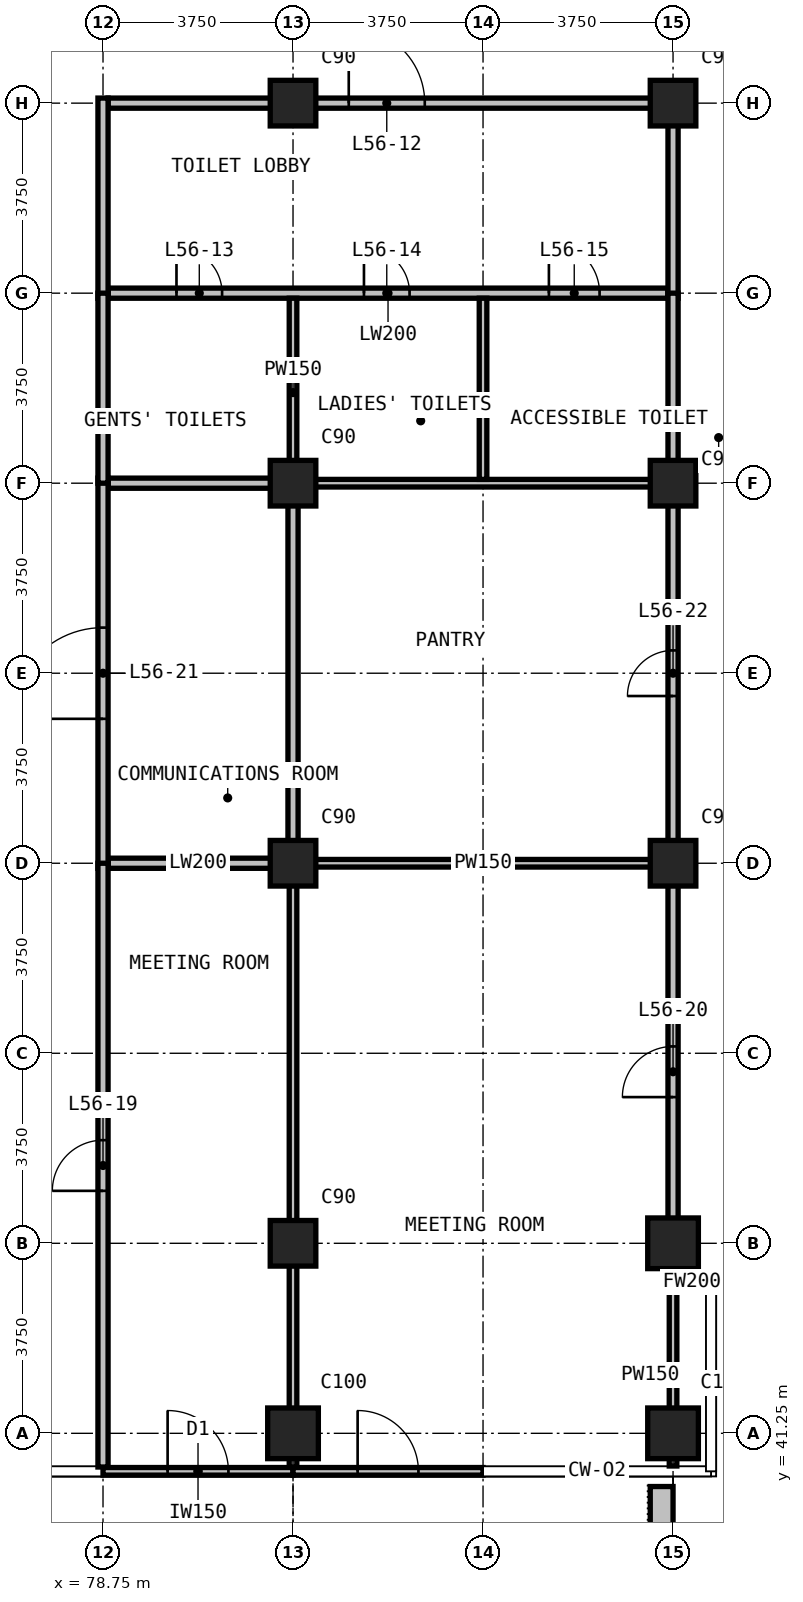
"""IFC4 building model, lengths in metres.
Left out: names, types, materials, properties, quantities, classifications, styles, units other than length and angle.
Written with IfcOpenShell. Run it as: python <this file> out.ifc"""

import sys

from ifc_helpers import new_model, si_unit, direction, frame, frame_2d, origin, origin_2d, place, context, subcontext, project, spatial, rectangle, extrude, element, fill, save


model = new_model("IFC4")
c1 = context("Model", 3, precision=1e-05, world=origin(), true_north=direction((0.0, 1.0)))
c2 = subcontext(c1, "Body", "Model", "MODEL_VIEW")
j1 = project(units=[si_unit("LENGTHUNIT", "METRE"), si_unit("PLANEANGLEUNIT", "RADIAN")], contexts=[c1])
p1 = place(None, origin())
s1 = spatial("IfcSite", under=j1, at=p1, CompositionType="ELEMENT")
p2 = place(p1, origin())
s2 = spatial("IfcBuilding", under=s1, at=p2, CompositionType="ELEMENT")
p3 = place(p2, frame((0.0, 0.0, 217.5)))
s3 = spatial("IfcBuildingStorey", under=s2, at=p3, CompositionType="ELEMENT", Elevation=217.5)
p4 = place(p3, frame((82.5, 41.25, 0.0), z_axis=(0.0, 0.0, 1.0), x_axis=(1.0, 0.0, 0.0)))
e1 = element("IfcColumn", 1, at=p4, inside=s3, PredefinedType="COLUMN", context=c2, shape_type="SweptSolid", body=[
    extrude(rectangle(XDim=1.0, YDim=1.0, at=origin_2d()), origin(), (0.0, 0.0, 1.0), 3.6),
])
for number, where, z_axis, x_axis in (
    (2, (82.5, 45.0, 0.0), (0.0, 0.0, 1.0), (1.0, 0.0, 0.0)),
    (3, (82.5, 52.5, 0.0), (0.0, 0.0, 1.0), (1.0, 0.0, 0.0)),
    (4, (82.5, 60.0, 0.0), (0.0, 0.0, 1.0), (1.0, 0.0, 0.0)),
    (5, (82.5, 67.5, 0.0), (0.0, 0.0, 1.0), (1.0, 0.0, 0.0)),
):
    element("IfcColumn", number, at=place(p3, frame(where, z_axis=z_axis, x_axis=x_axis)), inside=s3, PredefinedType="COLUMN", context=c2, shape_type="SweptSolid", body=[
        extrude(rectangle(XDim=0.9, YDim=0.9, at=origin_2d()), origin(), (0.0, 0.0, 1.0), 3.6),
    ])
for number, where, z_axis, x_axis in (
    (6, (90.0, 41.25, 0.0), (0.0, 0.0, 1.0), (1.0, 0.0, 0.0)),
    (7, (90.0, 45.0, 0.0), (0.0, 0.0, 1.0), (1.0, 0.0, 0.0)),
):
    element("IfcColumn", number, at=place(p3, frame(where, z_axis=z_axis, x_axis=x_axis)), inside=s3, PredefinedType="COLUMN", context=c2, shape_type="SweptSolid", body=[
        extrude(rectangle(XDim=1.0, YDim=1.0, at=origin_2d()), origin(), (0.0, 0.0, 1.0), 3.6),
    ])
for number, where, z_axis, x_axis in (
    (8, (90.0, 52.5, 0.0), (0.0, 0.0, 1.0), (1.0, 0.0, 0.0)),
    (9, (90.0, 60.0, 0.0), (0.0, 0.0, 1.0), (1.0, 0.0, 0.0)),
    (10, (90.0, 67.5, 0.0), (0.0, 0.0, 1.0), (1.0, 0.0, 0.0)),
):
    element("IfcColumn", number, at=place(p3, frame(where, z_axis=z_axis, x_axis=x_axis)), inside=s3, PredefinedType="COLUMN", context=c2, shape_type="SweptSolid", body=[
        extrude(rectangle(XDim=0.9, YDim=0.9, at=origin_2d()), origin(), (0.0, 0.0, 1.0), 3.6),
    ])
p5 = place(p3, frame((78.75, 40.5, 0.0), z_axis=(0.0, 0.0, 1.0), x_axis=(1.0, 0.0, 0.0)))
e11 = element("IfcWall", 11, at=p5, inside=s3, PredefinedType="SOLIDWALL", context=c2, shape_type="SweptSolid", body=[
    extrude(rectangle(XDim=3.75, YDim=0.15, at=frame_2d((1.875, 0.0))), origin(), (0.0, 0.0, 1.0), 3.3),
])
p6 = place(p5, frame((1.275, 0.0, 0.0)))
e12 = element("IfcOpeningElement", 12, at=p6, cuts=e11, PredefinedType="OPENING", context=c2, shape_type="SweptSolid", body=[
    extrude(rectangle(XDim=1.2, YDim=2.4, at=frame_2d((0.6, 1.2))), frame((0.0, 0.085, 0.0), z_axis=(0.0, -1.0, 0.0), x_axis=(1.0, 0.0, 0.0)), (0.0, 0.0, 1.0), 0.17),
])
p7 = place(p3, frame((82.5, 40.5, 0.0), z_axis=(0.0, 0.0, 1.0), x_axis=(1.0, 0.0, 0.0)))
e13 = element("IfcWall", 13, at=p7, inside=s3, PredefinedType="SOLIDWALL", context=c2, shape_type="SweptSolid", body=[
    extrude(rectangle(XDim=3.75, YDim=0.15, at=frame_2d((1.875, 0.0))), origin(), (0.0, 0.0, 1.0), 3.3),
])
p8 = place(p7, frame((1.275, 0.0, 0.0)))
e14 = element("IfcOpeningElement", 14, at=p8, cuts=e13, PredefinedType="OPENING", context=c2, shape_type="SweptSolid", body=[
    extrude(rectangle(XDim=1.2, YDim=2.4, at=frame_2d((0.6, 1.2))), frame((0.0, 0.085, 0.0), z_axis=(0.0, -1.0, 0.0), x_axis=(1.0, 0.0, 0.0)), (0.0, 0.0, 1.0), 0.17),
])
p9 = place(p3, frame((89.775, 40.2, 0.0), z_axis=(0.0, 0.0, 1.0), x_axis=(0.0, -1.0, 0.0)))
e15 = element("IfcWall", 15, at=p9, inside=s3, PredefinedType="USERDEFINED", context=c2, shape_type="SweptSolid", body=[
    extrude(rectangle(XDim=2.35, YDim=0.45, at=frame_2d((1.175, 0.0))), origin(), (0.0, 0.0, 1.0), 1.1),
])
for number, where, z_axis, x_axis in (
    (16, (78.85, 52.5, 0.0), (0.0, 0.0, 1.0), (1.0, 0.0, 0.0)),
    (17, (78.85, 60.0, 0.0), (0.0, 0.0, 1.0), (1.0, 0.0, 0.0)),
):
    element("IfcWall", number, at=place(p3, frame(where, z_axis=z_axis, x_axis=x_axis)), inside=s3, PredefinedType="PARTITIONING", context=c2, shape_type="SweptSolid", body=[
        extrude(rectangle(XDim=3.55, YDim=0.2, at=frame_2d((1.775, 0.0))), origin(), (0.0, 0.0, 1.0), 3.3),
    ])
p10 = place(p3, frame((78.85, 63.75, 0.0), z_axis=(0.0, 0.0, 1.0), x_axis=(1.0, 0.0, 0.0)))
e18 = element("IfcWall", 18, at=p10, inside=s3, PredefinedType="PARTITIONING", context=c2, shape_type="SweptSolid", body=[
    extrude(rectangle(XDim=11.05, YDim=0.2, at=frame_2d((5.525, 0.0))), origin(), (0.0, 0.0, 1.0), 3.3),
])
p11 = place(p10, frame((1.35, 0.0, 0.0)))
e19 = element("IfcOpeningElement", 19, at=p11, cuts=e18, PredefinedType="OPENING", context=c2, shape_type="SweptSolid", body=[
    extrude(rectangle(XDim=0.9, YDim=2.2, at=frame_2d((0.45, 1.1))), frame((0.0, 0.11, 0.0), z_axis=(0.0, -1.0, 0.0), x_axis=(1.0, 0.0, 0.0)), (0.0, 0.0, 1.0), 0.22),
])
p12 = place(p10, frame((5.05, 0.0, 0.0)))
e20 = element("IfcOpeningElement", 20, at=p12, cuts=e18, PredefinedType="OPENING", context=c2, shape_type="SweptSolid", body=[
    extrude(rectangle(XDim=0.9, YDim=2.2, at=frame_2d((0.45, 1.1))), frame((0.0, 0.11, 0.0), z_axis=(0.0, -1.0, 0.0), x_axis=(1.0, 0.0, 0.0)), (0.0, 0.0, 1.0), 0.22),
])
p13 = place(p10, frame((8.7, 0.0, 0.0)))
e21 = element("IfcOpeningElement", 21, at=p13, cuts=e18, PredefinedType="OPENING", context=c2, shape_type="SweptSolid", body=[
    extrude(rectangle(XDim=1.0, YDim=2.2, at=frame_2d((0.5, 1.1))), frame((0.0, 0.11, 0.0), z_axis=(0.0, -1.0, 0.0), x_axis=(1.0, 0.0, 0.0)), (0.0, 0.0, 1.0), 0.22),
])
p14 = place(p3, frame((78.85, 67.5, 0.0), z_axis=(0.0, 0.0, 1.0), x_axis=(1.0, 0.0, 0.0)))
e22 = element("IfcWall", 22, at=p14, inside=s3, PredefinedType="PARTITIONING", context=c2, shape_type="SweptSolid", body=[
    extrude(rectangle(XDim=11.05, YDim=0.2, at=frame_2d((5.525, 0.0))), origin(), (0.0, 0.0, 1.0), 3.3),
])
p15 = place(p14, frame((4.75, 0.0, 0.0)))
e23 = element("IfcOpeningElement", 23, at=p15, cuts=e22, PredefinedType="OPENING", context=c2, shape_type="SweptSolid", body=[
    extrude(rectangle(XDim=1.5, YDim=2.2, at=frame_2d((0.75, 1.1))), frame((0.0, 0.11, 0.0), z_axis=(0.0, -1.0, 0.0), x_axis=(1.0, 0.0, 0.0)), (0.0, 0.0, 1.0), 0.22),
])
p16 = place(p3, frame((78.75, 52.4, 0.0), z_axis=(0.0, 0.0, 1.0), x_axis=(0.0, 1.0, 0.0)))
e24 = element("IfcWall", 24, at=p16, inside=s3, PredefinedType="PARTITIONING", context=c2, shape_type="SweptSolid", body=[
    extrude(rectangle(XDim=7.7, YDim=0.2, at=frame_2d((3.85, 0.0))), origin(), (0.0, 0.0, 1.0), 3.3),
])
p17 = place(p16, frame((2.95, 0.0, 0.0)))
e25 = element("IfcOpeningElement", 25, at=p17, cuts=e24, PredefinedType="OPENING", context=c2, shape_type="SweptSolid", body=[
    extrude(rectangle(XDim=1.8, YDim=2.4, at=frame_2d((0.9, 1.2))), frame((0.0, 0.11, 0.0), z_axis=(0.0, -1.0, 0.0), x_axis=(1.0, 0.0, 0.0)), (0.0, 0.0, 1.0), 0.22),
])
p18 = place(p3, frame((78.75, 63.65, 0.0), z_axis=(0.0, 0.0, 1.0), x_axis=(0.0, 1.0, 0.0)))
e26 = element("IfcWall", 26, at=p18, inside=s3, PredefinedType="PARTITIONING", context=c2, shape_type="SweptSolid", body=[
    extrude(rectangle(XDim=3.95, YDim=0.2, at=frame_2d((1.975, 0.0))), origin(), (0.0, 0.0, 1.0), 3.3),
])
p19 = place(p3, frame((82.5, 52.4, 0.0), z_axis=(0.0, 0.0, 1.0), x_axis=(0.0, 1.0, 0.0)))
e27 = element("IfcWall", 27, at=p19, inside=s3, PredefinedType="PARTITIONING", context=c2, shape_type="SweptSolid", body=[
    extrude(rectangle(XDim=7.7, YDim=0.2, at=frame_2d((3.85, 0.0))), origin(), (0.0, 0.0, 1.0), 3.3),
])
p20 = place(p3, frame((90.0, 63.65, 0.0), z_axis=(0.0, 0.0, 1.0), x_axis=(0.0, 1.0, 0.0)))
e28 = element("IfcWall", 28, at=p20, inside=s3, PredefinedType="PARTITIONING", context=c2, shape_type="SweptSolid", body=[
    extrude(rectangle(XDim=3.95, YDim=0.2, at=frame_2d((1.975, 0.0))), origin(), (0.0, 0.0, 1.0), 3.3),
])
p21 = place(p3, frame((90.1, 44.235, 0.0), z_axis=(0.0, 0.0, 1.0), x_axis=(1.0, 0.0, 0.0)))
e29 = element("IfcWall", 29, at=p21, inside=s3, PredefinedType="PARTITIONING", context=c2, shape_type="SweptSolid", body=[
    extrude(rectangle(XDim=0.545, YDim=0.2, at=frame_2d((0.272, 0.0))), origin(), (0.0, 0.0, 1.0), 3.3),
])
p22 = place(p3, frame((78.75, 40.585, 0.0), z_axis=(0.0, 0.0, 1.0), x_axis=(0.0, 1.0, 0.0)))
e30 = element("IfcWall", 30, at=p22, inside=s3, PredefinedType="PARTITIONING", context=c2, shape_type="SweptSolid", body=[
    extrude(rectangle(XDim=11.915, YDim=0.2, at=frame_2d((5.958, 0.0))), origin(), (0.0, 0.0, 1.0), 3.3),
])
p23 = place(p22, frame((5.45, 0.0, 0.0)))
e31 = element("IfcOpeningElement", 31, at=p23, cuts=e30, PredefinedType="OPENING", context=c2, shape_type="SweptSolid", body=[
    extrude(rectangle(XDim=1.0, YDim=2.2, at=frame_2d((0.5, 1.1))), frame((0.0, 0.11, 0.0), z_axis=(0.0, -1.0, 0.0), x_axis=(1.0, 0.0, 0.0)), (0.0, 0.0, 1.0), 0.22),
])
p24 = place(p3, frame((78.75, 60.0, 0.0), z_axis=(0.0, 0.0, 1.0), x_axis=(0.0, 1.0, 0.0)))
e32 = element("IfcWall", 32, at=p24, inside=s3, PredefinedType="PARTITIONING", context=c2, shape_type="SweptSolid", body=[
    extrude(rectangle(XDim=3.75, YDim=0.2, at=frame_2d((1.875, 0.0))), origin(), (0.0, 0.0, 1.0), 3.3),
])
p25 = place(p3, frame((90.0, 44.135, 0.0), z_axis=(0.0, 0.0, 1.0), x_axis=(0.0, 1.0, 0.0)))
e33 = element("IfcWall", 33, at=p25, inside=s3, PredefinedType="PARTITIONING", context=c2, shape_type="SweptSolid", body=[
    extrude(rectangle(XDim=19.615, YDim=0.2, at=frame_2d((9.808, 0.0))), origin(), (0.0, 0.0, 1.0), 3.3),
])
p26 = place(p25, frame((3.75, 0.0, 0.0)))
e34 = element("IfcOpeningElement", 34, at=p26, cuts=e33, PredefinedType="OPENING", context=c2, shape_type="SweptSolid", body=[
    extrude(rectangle(XDim=1.0, YDim=2.2, at=frame_2d((0.5, 1.1))), frame((0.0, 0.11, 0.0), z_axis=(0.0, -1.0, 0.0), x_axis=(1.0, 0.0, 0.0)), (0.0, 0.0, 1.0), 0.22),
])
p27 = place(p25, frame((11.665, 0.0, 0.0)))
e35 = element("IfcOpeningElement", 35, at=p27, cuts=e33, PredefinedType="OPENING", context=c2, shape_type="SweptSolid", body=[
    extrude(rectangle(XDim=0.9, YDim=2.2, at=frame_2d((0.45, 1.1))), frame((0.0, 0.11, 0.0), z_axis=(0.0, -1.0, 0.0), x_axis=(1.0, 0.0, 0.0)), (0.0, 0.0, 1.0), 0.22),
])
for number, where, z_axis, x_axis in (
    (36, (82.6, 52.5, 0.0), (0.0, 0.0, 1.0), (1.0, 0.0, 0.0)),
    (37, (82.6, 60.0, 0.0), (0.0, 0.0, 1.0), (1.0, 0.0, 0.0)),
):
    element("IfcWall", number, at=place(p3, frame(where, z_axis=z_axis, x_axis=x_axis)), inside=s3, PredefinedType="PARTITIONING", context=c2, shape_type="SweptSolid", body=[
        extrude(rectangle(XDim=7.3, YDim=0.15, at=frame_2d((3.65, 0.0))), origin(), (0.0, 0.0, 1.0), 3.3),
    ])
p28 = place(p3, frame((82.5, 40.585, 0.0), z_axis=(0.0, 0.0, 1.0), x_axis=(0.0, 1.0, 0.0)))
e38 = element("IfcWall", 38, at=p28, inside=s3, PredefinedType="PARTITIONING", context=c2, shape_type="SweptSolid", body=[
    extrude(rectangle(XDim=11.99, YDim=0.15, at=frame_2d((5.995, 0.0))), origin(), (0.0, 0.0, 1.0), 3.3),
])
p29 = place(p3, frame((82.5, 59.925, 0.0), z_axis=(0.0, 0.0, 1.0), x_axis=(0.0, 1.0, 0.0)))
e39 = element("IfcWall", 39, at=p29, inside=s3, PredefinedType="PARTITIONING", context=c2, shape_type="SweptSolid", body=[
    extrude(rectangle(XDim=3.725, YDim=0.15, at=frame_2d((1.862, 0.0))), origin(), (0.0, 0.0, 1.0), 3.3),
])
p30 = place(p3, frame((86.25, 60.075, 0.0), z_axis=(0.0, 0.0, 1.0), x_axis=(0.0, 1.0, 0.0)))
e40 = element("IfcWall", 40, at=p30, inside=s3, PredefinedType="PARTITIONING", context=c2, shape_type="SweptSolid", body=[
    extrude(rectangle(XDim=3.575, YDim=0.15, at=frame_2d((1.788, 0.0))), origin(), (0.0, 0.0, 1.0), 3.3),
])
p31 = place(p3, frame((90.0, 40.605, 0.0), z_axis=(0.0, 0.0, 1.0), x_axis=(0.0, 1.0, 0.0)))
e41 = element("IfcWall", 41, at=p31, inside=s3, PredefinedType="PARTITIONING", context=c2, shape_type="SweptSolid", body=[
    extrude(rectangle(XDim=3.6, YDim=0.15, at=frame_2d((1.8, 0.0))), origin(), (0.0, 0.0, 1.0), 3.3),
])
p32 = place(p6, origin())
e42 = element("IfcDoor", 42, at=p32, inside=s3, OperationType="SINGLE_SWING_LEFT", PredefinedType="DOOR", context=c2, shape_type="SweptSolid", body=[
    extrude(rectangle(XDim=1.2, YDim=2.4, at=frame_2d((0.6, 1.2))), frame((0.0, 0.025, 0.0), z_axis=(0.0, -1.0, 0.0), x_axis=(1.0, 0.0, 0.0)), (0.0, 0.0, 1.0), 0.05),
])
fill(e12, e42)
p33 = place(p8, origin())
e43 = element("IfcDoor", 43, at=p33, inside=s3, OperationType="SINGLE_SWING_LEFT", PredefinedType="DOOR", context=c2, shape_type="SweptSolid", body=[
    extrude(rectangle(XDim=1.2, YDim=2.4, at=frame_2d((0.6, 1.2))), frame((0.0, 0.025, 0.0), z_axis=(0.0, -1.0, 0.0), x_axis=(1.0, 0.0, 0.0)), (0.0, 0.0, 1.0), 0.05),
])
fill(e14, e43)
p34 = place(p15, origin())
e44 = element("IfcDoor", 44, at=p34, inside=s3, OperationType="DOUBLE_DOOR_SINGLE_SWING", PredefinedType="DOOR", context=c2, shape_type="SweptSolid", body=[
    extrude(rectangle(XDim=1.5, YDim=2.2, at=frame_2d((0.75, 1.1))), frame((0.0, 0.025, 0.0), z_axis=(0.0, -1.0, 0.0), x_axis=(1.0, 0.0, 0.0)), (0.0, 0.0, 1.0), 0.05),
])
fill(e23, e44)
p35 = place(p11, origin())
e45 = element("IfcDoor", 45, at=p35, inside=s3, OperationType="SINGLE_SWING_LEFT", PredefinedType="DOOR", context=c2, shape_type="SweptSolid", body=[
    extrude(rectangle(XDim=0.9, YDim=2.2, at=frame_2d((0.45, 1.1))), frame((0.0, 0.025, 0.0), z_axis=(0.0, -1.0, 0.0), x_axis=(1.0, 0.0, 0.0)), (0.0, 0.0, 1.0), 0.05),
])
fill(e19, e45)
p36 = place(p12, origin())
e46 = element("IfcDoor", 46, at=p36, inside=s3, OperationType="SINGLE_SWING_LEFT", PredefinedType="DOOR", context=c2, shape_type="SweptSolid", body=[
    extrude(rectangle(XDim=0.9, YDim=2.2, at=frame_2d((0.45, 1.1))), frame((0.0, 0.025, 0.0), z_axis=(0.0, -1.0, 0.0), x_axis=(1.0, 0.0, 0.0)), (0.0, 0.0, 1.0), 0.05),
])
fill(e20, e46)
p37 = place(p13, origin())
e47 = element("IfcDoor", 47, at=p37, inside=s3, OperationType="SINGLE_SWING_LEFT", PredefinedType="DOOR", context=c2, shape_type="SweptSolid", body=[
    extrude(rectangle(XDim=1.0, YDim=2.2, at=frame_2d((0.5, 1.1))), frame((0.0, 0.025, 0.0), z_axis=(0.0, -1.0, 0.0), x_axis=(1.0, 0.0, 0.0)), (0.0, 0.0, 1.0), 0.05),
])
fill(e21, e47)
p38 = place(p23, origin())
e48 = element("IfcDoor", 48, at=p38, inside=s3, OperationType="SINGLE_SWING_RIGHT", PredefinedType="DOOR", context=c2, shape_type="SweptSolid", body=[
    extrude(rectangle(XDim=1.0, YDim=2.2, at=frame_2d((0.5, 1.1))), frame((0.0, 0.025, 0.0), z_axis=(0.0, -1.0, 0.0), x_axis=(1.0, 0.0, 0.0)), (0.0, 0.0, 1.0), 0.05),
])
fill(e31, e48)
p39 = place(p26, origin())
e49 = element("IfcDoor", 49, at=p39, inside=s3, OperationType="SINGLE_SWING_LEFT", PredefinedType="DOOR", context=c2, shape_type="SweptSolid", body=[
    extrude(rectangle(XDim=1.0, YDim=2.2, at=frame_2d((0.5, 1.1))), frame((0.0, 0.025, 0.0), z_axis=(0.0, -1.0, 0.0), x_axis=(1.0, 0.0, 0.0)), (0.0, 0.0, 1.0), 0.05),
])
fill(e34, e49)
p40 = place(p17, origin())
e50 = element("IfcDoor", 50, at=p40, inside=s3, OperationType="DOUBLE_DOOR_SINGLE_SWING", PredefinedType="DOOR", context=c2, shape_type="SweptSolid", body=[
    extrude(rectangle(XDim=1.8, YDim=2.4, at=frame_2d((0.9, 1.2))), frame((0.0, 0.025, 0.0), z_axis=(0.0, -1.0, 0.0), x_axis=(1.0, 0.0, 0.0)), (0.0, 0.0, 1.0), 0.05),
])
fill(e25, e50)
p41 = place(p27, origin())
e51 = element("IfcDoor", 51, at=p41, inside=s3, OperationType="SINGLE_SWING_LEFT", PredefinedType="DOOR", context=c2, shape_type="SweptSolid", body=[
    extrude(rectangle(XDim=0.9, YDim=2.2, at=frame_2d((0.45, 1.1))), frame((0.0, 0.025, 0.0), z_axis=(0.0, -1.0, 0.0), x_axis=(1.0, 0.0, 0.0)), (0.0, 0.0, 1.0), 0.05),
])
fill(e35, e51)
save(model, sys.argv[1])
